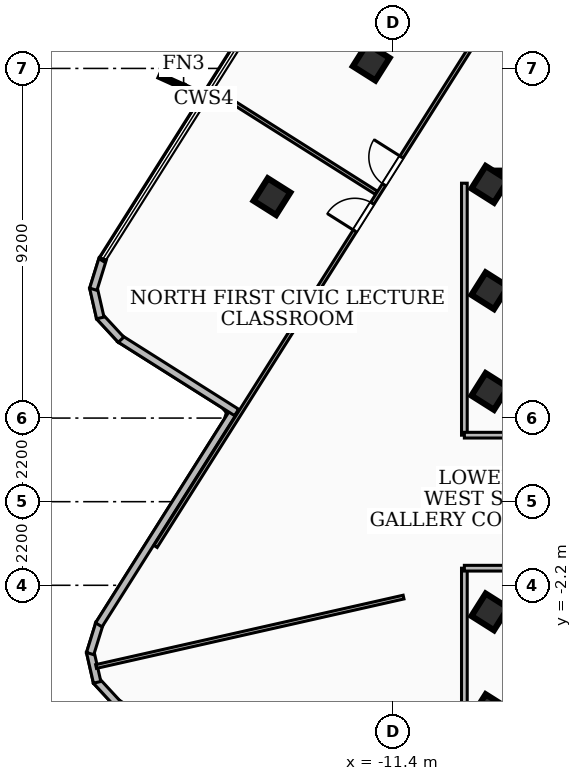
"""IFC4 building model, lengths in metres.
Left out: names, types, materials, properties, quantities, classifications, styles, units other than length and angle.
Written with IfcOpenShell. Run it as: python <this file> out.ifc"""

import sys

from ifc_helpers import new_model, si_unit, direction, frame, frame_2d, origin, origin_2d, place, context, subcontext, project, spatial, rectangle, extrude, element, fill, save


model = new_model("IFC4")
c1 = context("Model", 3, precision=1e-05, world=origin(), true_north=direction((0.0, 1.0)))
c2 = subcontext(c1, "Body", "Model", "MODEL_VIEW")
j1 = project(units=[si_unit("LENGTHUNIT", "METRE"), si_unit("PLANEANGLEUNIT", "RADIAN")], contexts=[c1])
p1 = place(None, origin())
s1 = spatial("IfcSite", under=j1, at=p1, CompositionType="ELEMENT")
p2 = place(p1, origin())
s2 = spatial("IfcBuilding", under=s1, at=p2, CompositionType="ELEMENT")
p3 = place(p2, frame((0.0, 0.0, 274.86)))
s3 = spatial("IfcBuildingStorey", under=s2, at=p3, CompositionType="ELEMENT", Elevation=274.86)
p4 = place(p3, frame((-8.78, 8.51, 0.0), z_axis=(0.0, 0.0, 1.0), x_axis=(1.0, 0.0, 0.0)))
e1 = element("IfcWall", 1, at=p4, inside=s3, PredefinedType="SHEAR", context=c2, shape_type="SweptSolid", body=[
    extrude(rectangle(XDim=17.56, YDim=0.4, at=frame_2d((8.78, 0.0))), origin(), (0.0, 0.0, 1.0), 3.16),
])
for number, where, z_axis, x_axis in (
    (2, (-8.85, -5.55, 0.0), (0.0, 0.0, 1.0), (0.534, 0.845, 0.0)),
    (3, (-8.85, -2.9, 0.0), (0.0, 0.0, 1.0), (0.534, 0.845, 0.0)),
    (4, (-8.85, 2.9, 0.0), (0.0, 0.0, 1.0), (0.534, 0.845, 0.0)),
    (5, (-8.85, 5.55, 0.0), (0.0, 0.0, 1.0), (0.534, 0.845, 0.0)),
    (6, (-8.85, 8.35, 0.0), (0.0, 0.0, 1.0), (0.534, 0.845, 0.0)),
    (7, (-11.971, 11.566, 0.0), (0.0, 0.0, 1.0), (0.534, 0.845, 0.0)),
    (8, (-14.583, 8.026, 0.0), (0.0, 0.0, 1.0), (0.534, 0.845, 0.0)),
):
    element("IfcColumn", number, at=place(p3, frame(where, z_axis=z_axis, x_axis=x_axis)), inside=s3, PredefinedType="COLUMN", context=c2, shape_type="SweptSolid", body=[
        extrude(rectangle(XDim=0.7, YDim=0.7, at=origin_2d()), origin(), (0.0, 0.0, 1.0), 3.42),
    ])
p5 = place(p3, frame((3.241, -19.139, 0.0), z_axis=(0.0, 0.0, 1.0), x_axis=(-0.84545958519, 0.534039408481, 0.0)))
e9 = element("IfcWall", 9, at=p5, inside=s3, PredefinedType="SOLIDWALL", context=c2, shape_type="SweptSolid", body=[
    extrude(rectangle(XDim=25.923, YDim=0.2, at=frame_2d((12.961, 0.0))), origin(), (0.0, 0.0, 1.0), 3.16),
])
p6 = place(p5, frame((19.02, 0.0, 0.85)))
e10 = element("IfcOpeningElement", 10, at=p6, cuts=e9, PredefinedType="OPENING", context=c2, shape_type="SweptSolid", body=[
    extrude(rectangle(XDim=2.4, YDim=1.65, at=frame_2d((1.2, 0.825))), frame((0.0, 0.11, 0.0), z_axis=(0.0, -1.0, 0.0), x_axis=(1.0, 0.0, 0.0)), (0.0, 0.0, 1.0), 0.22),
])
p7 = place(p3, frame((-18.638, -5.326, 0.0), z_axis=(0.0, 0.0, 1.0), x_axis=(-0.678558613405, 0.734546260064, 0.0)))
e11 = element("IfcWall", 11, at=p7, inside=s3, PredefinedType="SOLIDWALL", context=c2, shape_type="SweptSolid", body=[
    extrude(rectangle(XDim=0.837, YDim=0.2, at=frame_2d((0.418, 0.0))), origin(), (0.0, 0.0, 1.0), 3.16),
])
p8 = place(p3, frame((-19.183, -4.753, 0.0), z_axis=(0.0, 0.0, 1.0), x_axis=(-0.22178748126, 0.975095027757, 0.0)))
e12 = element("IfcWall", 12, at=p8, inside=s3, PredefinedType="SOLIDWALL", context=c2, shape_type="SweptSolid", body=[
    extrude(rectangle(XDim=0.824, YDim=0.2, at=frame_2d((0.412, 0.0))), origin(), (0.0, 0.0, 1.0), 3.16),
])
p9 = place(p3, frame((-19.367, -3.997, 0.0), z_axis=(0.0, 0.0, 1.0), x_axis=(0.295803919306, 0.955248680357, 0.0)))
e13 = element("IfcWall", 13, at=p9, inside=s3, PredefinedType="SOLIDWALL", context=c2, shape_type="SweptSolid", body=[
    extrude(rectangle(XDim=0.839, YDim=0.2, at=frame_2d((0.419, 0.0))), origin(), (0.0, 0.0, 1.0), 3.16),
])
p10 = place(p3, frame((-19.139, -3.241, 0.0), z_axis=(0.0, 0.0, 1.0), x_axis=(0.534084270085, 0.845431246435, 0.0)))
e14 = element("IfcWall", 14, at=p10, inside=s3, PredefinedType="SOLIDWALL", context=c2, shape_type="SweptSolid", body=[
    extrude(rectangle(XDim=6.742, YDim=0.2, at=frame_2d((3.371, 0.0))), origin(), (0.0, 0.0, 1.0), 3.16),
])
p11 = place(p3, frame((-15.513, 2.348, 0.0), z_axis=(0.0, 0.0, 1.0), x_axis=(-0.8454427056, 0.534066130313, 0.0)))
e15 = element("IfcWall", 15, at=p11, inside=s3, PredefinedType="SOLIDWALL", context=c2, shape_type="SweptSolid", body=[
    extrude(rectangle(XDim=3.642, YDim=0.2, at=frame_2d((1.821, 0.0))), origin(), (0.0, 0.0, 1.0), 3.16),
])
p12 = place(p3, frame((-18.554, 4.262, 0.0), z_axis=(0.0, 0.0, 1.0), x_axis=(-0.679187212508, 0.73396507435, 0.0)))
e16 = element("IfcWall", 16, at=p12, inside=s3, PredefinedType="SOLIDWALL", context=c2, shape_type="SweptSolid", body=[
    extrude(rectangle(XDim=0.838, YDim=0.2, at=frame_2d((0.419, 0.0))), origin(), (0.0, 0.0, 1.0), 3.16),
])
p13 = place(p3, frame((-19.1, 4.835, 0.0), z_axis=(0.0, 0.0, 1.0), x_axis=(-0.222043922605, 0.975036664149, 0.0)))
e17 = element("IfcWall", 17, at=p13, inside=s3, PredefinedType="SOLIDWALL", context=c2, shape_type="SweptSolid", body=[
    extrude(rectangle(XDim=0.823, YDim=0.2, at=frame_2d((0.412, 0.0))), origin(), (0.0, 0.0, 1.0), 3.16),
])
p14 = place(p3, frame((-19.284, 5.59, 0.0), z_axis=(0.0, 0.0, 1.0), x_axis=(0.295803919306, 0.955248680357, 0.0)))
e18 = element("IfcWall", 18, at=p14, inside=s3, PredefinedType="SOLIDWALL", context=c2, shape_type="SweptSolid", body=[
    extrude(rectangle(XDim=0.839, YDim=0.2, at=frame_2d((0.419, 0.0))), origin(), (0.0, 0.0, 1.0), 3.16),
])
p15 = place(p3, frame((-9.52, 1.75, 0.0), z_axis=(0.0, 0.0, 1.0), x_axis=(0.0, 1.0, 0.0)))
e19 = element("IfcWall", 19, at=p15, inside=s3, PredefinedType="PARTITIONING", context=c2, shape_type="SweptSolid", body=[
    extrude(rectangle(XDim=6.63, YDim=0.15, at=frame_2d((3.315, 0.0))), origin(), (0.0, 0.0, 1.0), 2.53),
])
p16 = place(p3, frame((-7.85, 1.75, 0.0), z_axis=(0.0, 0.0, 1.0), x_axis=(-1.0, 0.0, 0.0)))
e20 = element("IfcWall", 20, at=p16, inside=s3, PredefinedType="PARTITIONING", context=c2, shape_type="SweptSolid", body=[
    extrude(rectangle(XDim=1.67, YDim=0.15, at=frame_2d((0.835, 0.0))), origin(), (0.0, 0.0, 1.0), 2.39),
])
p17 = place(p3, frame((-9.52, -8.38, 0.0), z_axis=(0.0, 0.0, 1.0), x_axis=(0.0, 1.0, 0.0)))
e21 = element("IfcWall", 21, at=p17, inside=s3, PredefinedType="PARTITIONING", context=c2, shape_type="SweptSolid", body=[
    extrude(rectangle(XDim=6.63, YDim=0.15, at=frame_2d((3.315, 0.0))), origin(), (0.0, 0.0, 1.0), 3.16),
])
p18 = place(p3, frame((-7.85, -1.75, 0.0), z_axis=(0.0, 0.0, 1.0), x_axis=(-1.0, 0.0, 0.0)))
e22 = element("IfcWall", 22, at=p18, inside=s3, PredefinedType="PARTITIONING", context=c2, shape_type="SweptSolid", body=[
    extrude(rectangle(XDim=1.67, YDim=0.15, at=frame_2d((0.835, 0.0))), origin(), (0.0, 0.0, 1.0), 2.39),
])
p19 = place(p3, frame((-11.12, -2.51, 0.0), z_axis=(0.0, 0.0, 1.0), x_axis=(-0.975442430033, -0.220254547494, 0.0)))
e23 = element("IfcWall", 23, at=p19, inside=s3, PredefinedType="PARTITIONING", context=c2, shape_type="SweptSolid", body=[
    extrude(rectangle(XDim=8.294, YDim=0.1, at=frame_2d((4.147, 0.0))), origin(), (0.0, 0.0, 1.0), 3.16),
])
p20 = place(p3, frame((-11.838, 8.129, 0.0), z_axis=(0.0, 0.0, 1.0), x_axis=(-0.845412458252, 0.53411400977, 0.0)))
e24 = element("IfcWall", 24, at=p20, inside=s3, PredefinedType="PARTITIONING", context=c2, shape_type="SweptSolid", body=[
    extrude(rectangle(XDim=5.085, YDim=0.1, at=frame_2d((2.542, 0.0))), origin(), (0.0, 0.0, 1.0), 2.53),
])
p21 = place(p3, frame((-17.646, -1.178, 0.0), z_axis=(0.0, 0.0, 1.0), x_axis=(0.534052309352, 0.845451436143, 0.0)))
e25 = element("IfcWall", 25, at=p21, inside=s3, PredefinedType="PARTITIONING", context=c2, shape_type="SweptSolid", body=[
    extrude(rectangle(XDim=20.44, YDim=0.1, at=frame_2d((10.22, 0.0))), origin(), (0.0, 0.0, 1.0), 2.53),
])
p22 = place(p21, frame((11.259, 0.0, 0.0)))
e26 = element("IfcOpeningElement", 26, at=p22, cuts=e25, PredefinedType="OPENING", context=c2, shape_type="SweptSolid", body=[
    extrude(rectangle(XDim=0.86, YDim=2.04, at=frame_2d((0.43, 1.02))), frame((0.0, 0.06, 0.0), z_axis=(0.0, -1.0, 0.0), x_axis=(1.0, 0.0, 0.0)), (0.0, 0.0, 1.0), 0.12),
])
p23 = place(p21, frame((9.819, 0.0, 0.0)))
e27 = element("IfcOpeningElement", 27, at=p23, cuts=e25, PredefinedType="OPENING", context=c2, shape_type="SweptSolid", body=[
    extrude(rectangle(XDim=0.86, YDim=2.04, at=frame_2d((0.43, 1.02))), frame((0.0, 0.06, 0.0), z_axis=(0.0, -1.0, 0.0), x_axis=(1.0, 0.0, 0.0)), (0.0, 0.0, 1.0), 0.12),
])
p24 = place(p22, origin())
e28 = element("IfcDoor", 28, at=p24, inside=s3, OperationType="SINGLE_SWING_RIGHT", PredefinedType="DOOR", context=c2, shape_type="SweptSolid", body=[
    extrude(rectangle(XDim=0.86, YDim=2.04, at=frame_2d((0.43, 1.02))), frame((0.0, 0.025, 0.0), z_axis=(0.0, -1.0, 0.0), x_axis=(1.0, 0.0, 0.0)), (0.0, 0.0, 1.0), 0.05),
])
fill(e26, e28)
p25 = place(p23, origin())
e29 = element("IfcDoor", 29, at=p25, inside=s3, OperationType="SINGLE_SWING_LEFT", PredefinedType="DOOR", context=c2, shape_type="SweptSolid", body=[
    extrude(rectangle(XDim=0.86, YDim=2.04, at=frame_2d((0.43, 1.02))), frame((0.0, 0.025, 0.0), z_axis=(0.0, -1.0, 0.0), x_axis=(1.0, 0.0, 0.0)), (0.0, 0.0, 1.0), 0.05),
])
fill(e27, e29)
save(model, sys.argv[1])
